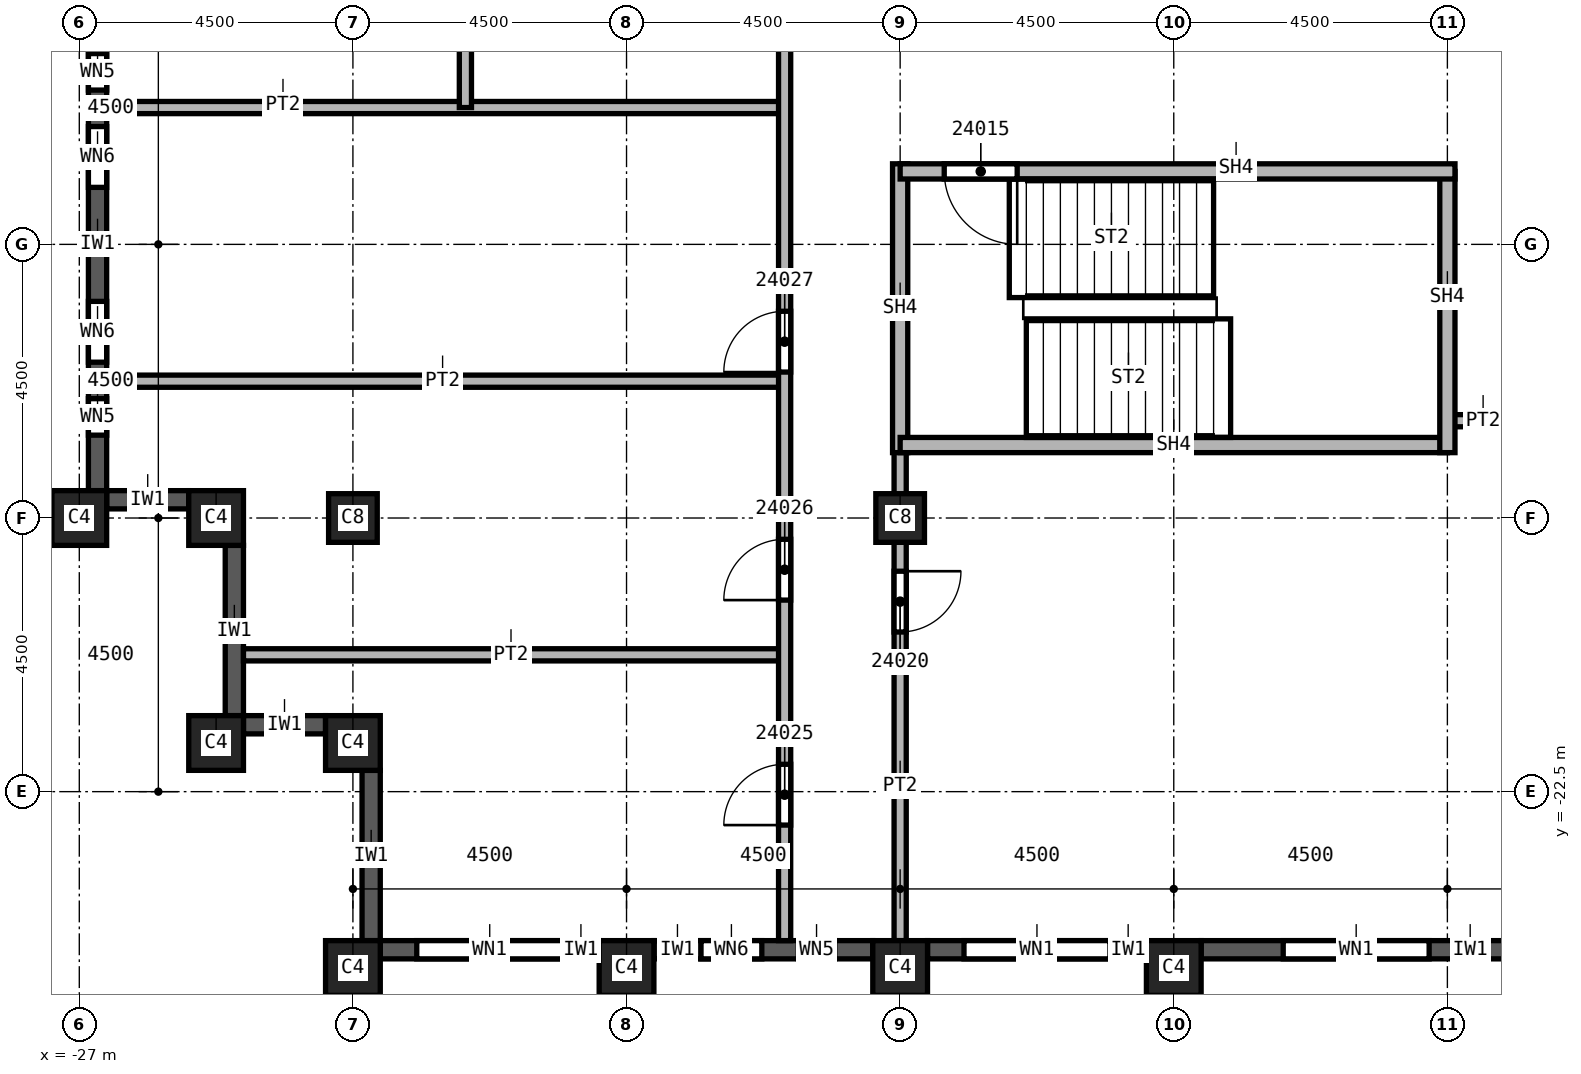
"""IFC4 building model, lengths in metres.
Left out: names, types, materials, properties, quantities, classifications, styles, units other than length and angle.
Written with IfcOpenShell. Run it as: python <this file> out.ifc"""

import sys

from ifc_helpers import new_model, si_unit, direction, frame, frame_2d, origin, origin_2d, place, context, subcontext, project, spatial, rectangle, extrude, element, fill, save


model = new_model("IFC4")
c1 = context("Model", 3, precision=1e-05, world=origin(), true_north=direction((0.0, 1.0)))
c2 = subcontext(c1, "Body", "Model", "MODEL_VIEW")
j1 = project(units=[si_unit("LENGTHUNIT", "METRE"), si_unit("PLANEANGLEUNIT", "RADIAN")], contexts=[c1])
p1 = place(None, origin())
s1 = spatial("IfcSite", under=j1, at=p1, CompositionType="ELEMENT")
p2 = place(p1, origin())
s2 = spatial("IfcBuilding", under=s1, at=p2, CompositionType="ELEMENT")
p3 = place(p2, frame((0.0, 0.0, 338.0)))
s3 = spatial("IfcBuildingStorey", under=s2, at=p3, CompositionType="ELEMENT", Elevation=338.0)
for number, where, z_axis, x_axis in (
    (1, (-13.5, -18.0, 0.0), (0.0, 0.0, 1.0), (1.0, 0.0, 0.0)),
    (2, (-22.5, -18.0, 0.0), (0.0, 0.0, 1.0), (1.0, 0.0, 0.0)),
):
    element("IfcColumn", number, at=place(p3, frame(where, z_axis=z_axis, x_axis=x_axis)), inside=s3, PredefinedType="COLUMN", context=c2, shape_type="SweptSolid", body=[
        extrude(rectangle(XDim=0.8, YDim=0.8, at=origin_2d()), origin(), (0.0, 0.0, 1.0), 3.74),
    ])
for number, where, z_axis, x_axis in (
    (3, (-9.0, -25.4, 0.0), (0.0, 0.0, 1.0), (1.0, 0.0, 0.0)),
    (4, (-13.5, -25.4, 0.0), (0.0, 0.0, 1.0), (1.0, 0.0, 0.0)),
    (5, (-18.0, -25.4, 0.0), (0.0, 0.0, 1.0), (1.0, 0.0, 0.0)),
    (6, (-22.5, -25.4, 0.0), (0.0, 0.0, 1.0), (1.0, 0.0, 0.0)),
    (7, (-27.0, -18.0, 0.0), (0.0, 0.0, 1.0), (0.0, 1.0, 0.0)),
    (8, (-22.5, -21.7, 0.0), (0.0, 0.0, 1.0), (1.0, 0.0, 0.0)),
    (9, (-24.75, -21.7, 0.0), (0.0, 0.0, 1.0), (1.0, 0.0, 0.0)),
    (10, (-24.75, -18.0, 0.0), (0.0, 0.0, 1.0), (1.0, 0.0, 0.0)),
):
    element("IfcColumn", number, at=place(p3, frame(where, z_axis=z_axis, x_axis=x_axis)), inside=s3, PredefinedType="COLUMN", context=c2, shape_type="SweptSolid", body=[
        extrude(rectangle(XDim=0.9, YDim=0.9, at=origin_2d()), origin(), (0.0, 0.0, 1.0), 3.74),
    ])
p4 = place(p3, frame((-26.7, -9.45, 0.0), z_axis=(0.0, 0.0, 1.0), x_axis=(0.0, -1.0, 0.0)))
e11 = element("IfcWall", 11, at=p4, inside=s3, PredefinedType="SOLIDWALL", context=c2, shape_type="SweptSolid", body=[
    extrude(rectangle(XDim=8.1, YDim=0.3, at=frame_2d((4.05, 0.0))), origin(), (0.0, 0.0, 1.0), 3.14),
])
p5 = place(p4, frame((0.913, 0.0, 0.8)))
e12 = element("IfcOpeningElement", 12, at=p5, cuts=e11, PredefinedType="OPENING", context=c2, shape_type="SweptSolid", body=[
    extrude(rectangle(XDim=0.6, YDim=1.95, at=frame_2d((0.3, 0.975))), frame((0.0, 0.15, 0.0), z_axis=(0.0, -1.0, 0.0), x_axis=(1.0, 0.0, 0.0)), (0.0, 0.0, 1.0), 0.3),
])
p6 = place(p4, frame((2.113, 0.0, 0.8)))
e13 = element("IfcOpeningElement", 13, at=p6, cuts=e11, PredefinedType="OPENING", context=c2, shape_type="SweptSolid", body=[
    extrude(rectangle(XDim=1.0, YDim=1.95, at=frame_2d((0.5, 0.975))), frame((0.0, 0.15, 0.0), z_axis=(0.0, -1.0, 0.0), x_axis=(1.0, 0.0, 0.0)), (0.0, 0.0, 1.0), 0.3),
])
p7 = place(p4, frame((4.988, 0.0, 0.8)))
e14 = element("IfcOpeningElement", 14, at=p7, cuts=e11, PredefinedType="OPENING", context=c2, shape_type="SweptSolid", body=[
    extrude(rectangle(XDim=1.0, YDim=1.95, at=frame_2d((0.5, 0.975))), frame((0.0, 0.15, 0.0), z_axis=(0.0, -1.0, 0.0), x_axis=(1.0, 0.0, 0.0)), (0.0, 0.0, 1.0), 0.3),
])
p8 = place(p4, frame((6.587, 0.0, 0.8)))
e15 = element("IfcOpeningElement", 15, at=p8, cuts=e11, PredefinedType="OPENING", context=c2, shape_type="SweptSolid", body=[
    extrude(rectangle(XDim=0.6, YDim=1.95, at=frame_2d((0.3, 0.975))), frame((0.0, 0.15, 0.0), z_axis=(0.0, -1.0, 0.0), x_axis=(1.0, 0.0, 0.0)), (0.0, 0.0, 1.0), 0.3),
])
p9 = place(p3, frame((-26.55, -17.7, 0.0), z_axis=(0.0, 0.0, 1.0), x_axis=(1.0, 0.0, 0.0)))
e16 = element("IfcWall", 16, at=p9, inside=s3, PredefinedType="SOLIDWALL", context=c2, shape_type="SweptSolid", body=[
    extrude(rectangle(XDim=1.35, YDim=0.3, at=frame_2d((0.675, 0.0))), origin(), (0.0, 0.0, 1.0), 3.14),
])
p10 = place(p3, frame((-24.45, -18.45, 0.0), z_axis=(0.0, 0.0, 1.0), x_axis=(0.0, -1.0, 0.0)))
e17 = element("IfcWall", 17, at=p10, inside=s3, PredefinedType="SOLIDWALL", context=c2, shape_type="SweptSolid", body=[
    extrude(rectangle(XDim=2.8, YDim=0.3, at=frame_2d((1.4, 0.0))), origin(), (0.0, 0.0, 1.0), 3.14),
])
p11 = place(p3, frame((-24.3, -21.4, 0.0), z_axis=(0.0, 0.0, 1.0), x_axis=(1.0, 0.0, 0.0)))
e18 = element("IfcWall", 18, at=p11, inside=s3, PredefinedType="SOLIDWALL", context=c2, shape_type="SweptSolid", body=[
    extrude(rectangle(XDim=1.35, YDim=0.3, at=frame_2d((0.675, 0.0))), origin(), (0.0, 0.0, 1.0), 3.14),
])
p12 = place(p3, frame((-22.2, -22.15, 0.0), z_axis=(0.0, 0.0, 1.0), x_axis=(0.0, -1.0, 0.0)))
e19 = element("IfcWall", 19, at=p12, inside=s3, PredefinedType="SOLIDWALL", context=c2, shape_type="SweptSolid", body=[
    extrude(rectangle(XDim=2.8, YDim=0.3, at=frame_2d((1.4, 0.0))), origin(), (0.0, 0.0, 1.0), 3.14),
])
p13 = place(p3, frame((-22.05, -25.1, 0.0), z_axis=(0.0, 0.0, 1.0), x_axis=(1.0, 0.0, 0.0)))
e20 = element("IfcWall", 20, at=p13, inside=s3, PredefinedType="SOLIDWALL", context=c2, shape_type="SweptSolid", body=[
    extrude(rectangle(XDim=3.6, YDim=0.3, at=frame_2d((1.8, 0.0))), origin(), (0.0, 0.0, 1.0), 3.14),
])
p14 = place(p13, frame((0.6, 0.0, 0.8)))
e21 = element("IfcOpeningElement", 21, at=p14, cuts=e20, PredefinedType="OPENING", context=c2, shape_type="SweptSolid", body=[
    extrude(rectangle(XDim=2.4, YDim=1.95, at=frame_2d((1.2, 0.975))), frame((0.0, 0.15, 0.0), z_axis=(0.0, -1.0, 0.0), x_axis=(1.0, 0.0, 0.0)), (0.0, 0.0, 1.0), 0.3),
])
p15 = place(p3, frame((-17.55, -25.1, 0.0), z_axis=(0.0, 0.0, 1.0), x_axis=(1.0, 0.0, 0.0)))
e22 = element("IfcWall", 22, at=p15, inside=s3, PredefinedType="SOLIDWALL", context=c2, shape_type="SweptSolid", body=[
    extrude(rectangle(XDim=3.6, YDim=0.3, at=frame_2d((1.8, 0.0))), origin(), (0.0, 0.0, 1.0), 3.14),
])
p16 = place(p15, frame((0.775, 0.0, 0.8)))
e23 = element("IfcOpeningElement", 23, at=p16, cuts=e22, PredefinedType="OPENING", context=c2, shape_type="SweptSolid", body=[
    extrude(rectangle(XDim=1.0, YDim=1.95, at=frame_2d((0.5, 0.975))), frame((0.0, 0.15, 0.0), z_axis=(0.0, -1.0, 0.0), x_axis=(1.0, 0.0, 0.0)), (0.0, 0.0, 1.0), 0.3),
])
p17 = place(p15, frame((2.375, 0.0, 0.8)))
e24 = element("IfcOpeningElement", 24, at=p17, cuts=e22, PredefinedType="OPENING", context=c2, shape_type="SweptSolid", body=[
    extrude(rectangle(XDim=0.6, YDim=1.95, at=frame_2d((0.3, 0.975))), frame((0.0, 0.15, 0.0), z_axis=(0.0, -1.0, 0.0), x_axis=(1.0, 0.0, 0.0)), (0.0, 0.0, 1.0), 0.3),
])
p18 = place(p3, frame((-13.05, -25.1, 0.0), z_axis=(0.0, 0.0, 1.0), x_axis=(1.0, 0.0, 0.0)))
e25 = element("IfcWall", 25, at=p18, inside=s3, PredefinedType="SOLIDWALL", context=c2, shape_type="SweptSolid", body=[
    extrude(rectangle(XDim=3.6, YDim=0.3, at=frame_2d((1.8, 0.0))), origin(), (0.0, 0.0, 1.0), 3.14),
])
p19 = place(p18, frame((0.6, 0.0, 0.8)))
e26 = element("IfcOpeningElement", 26, at=p19, cuts=e25, PredefinedType="OPENING", context=c2, shape_type="SweptSolid", body=[
    extrude(rectangle(XDim=2.4, YDim=1.95, at=frame_2d((1.2, 0.975))), frame((0.0, 0.15, 0.0), z_axis=(0.0, -1.0, 0.0), x_axis=(1.0, 0.0, 0.0)), (0.0, 0.0, 1.0), 0.3),
])
p20 = place(p3, frame((-8.55, -25.1, 0.0), z_axis=(0.0, 0.0, 1.0), x_axis=(1.0, 0.0, 0.0)))
e27 = element("IfcWall", 27, at=p20, inside=s3, PredefinedType="SOLIDWALL", context=c2, shape_type="SweptSolid", body=[
    extrude(rectangle(XDim=5.1, YDim=0.3, at=frame_2d((2.55, 0.0))), origin(), (0.0, 0.0, 1.0), 3.14),
])
p21 = place(p20, frame((1.35, 0.0, 0.8)))
e28 = element("IfcOpeningElement", 28, at=p21, cuts=e27, PredefinedType="OPENING", context=c2, shape_type="SweptSolid", body=[
    extrude(rectangle(XDim=2.4, YDim=1.95, at=frame_2d((1.2, 0.975))), frame((0.0, 0.15, 0.0), z_axis=(0.0, -1.0, 0.0), x_axis=(1.0, 0.0, 0.0)), (0.0, 0.0, 1.0), 0.3),
])
for number, where, z_axis, x_axis in (
    (29, (-26.55, -15.75, 0.0), (0.0, 0.0, 1.0), (1.0, 0.0, 0.0)),
    (30, (-26.55, -11.25, 0.0), (0.0, 0.0, 1.0), (1.0, 0.0, 0.0)),
):
    element("IfcWall", number, at=place(p3, frame(where, z_axis=z_axis, x_axis=x_axis)), inside=s3, PredefinedType="PARTITIONING", context=c2, shape_type="SweptSolid", body=[
        extrude(rectangle(XDim=11.15, YDim=0.2, at=frame_2d((5.575, 0.0))), origin(), (0.0, 0.0, 1.0), 3.74),
    ])
p22 = place(p3, frame((-24.3, -20.25, 0.0), z_axis=(0.0, 0.0, 1.0), x_axis=(1.0, 0.0, 0.0)))
e31 = element("IfcWall", 31, at=p22, inside=s3, PredefinedType="PARTITIONING", context=c2, shape_type="SweptSolid", body=[
    extrude(rectangle(XDim=8.9, YDim=0.2, at=frame_2d((4.45, 0.0))), origin(), (0.0, 0.0, 1.0), 3.74),
])
p23 = place(p3, frame((-20.65, -11.25, 0.0), z_axis=(0.0, 0.0, 1.0), x_axis=(0.0, 1.0, 0.0)))
e32 = element("IfcWall", 32, at=p23, inside=s3, PredefinedType="PARTITIONING", context=c2, shape_type="SweptSolid", body=[
    extrude(rectangle(XDim=11.25, YDim=0.2, at=frame_2d((5.625, 0.0))), origin(), (0.0, 0.0, 1.0), 3.74),
])
p24 = place(p23, frame((7.75, 0.0, 0.0)))
e33 = element("IfcOpeningElement", 33, at=p24, cuts=e32, PredefinedType="OPENING", context=c2, shape_type="SweptSolid", body=[
    extrude(rectangle(XDim=1.0, YDim=2.1, at=frame_2d((0.5, 1.05))), frame((0.0, 0.1, 0.0), z_axis=(0.0, -1.0, 0.0), x_axis=(1.0, 0.0, 0.0)), (0.0, 0.0, 1.0), 0.2),
])
p25 = place(p3, frame((-15.4, -24.95, 0.0), z_axis=(0.0, 0.0, 1.0), x_axis=(0.0, 1.0, 0.0)))
e34 = element("IfcWall", 34, at=p25, inside=s3, PredefinedType="PARTITIONING", context=c2, shape_type="SweptSolid", body=[
    extrude(rectangle(XDim=38.55, YDim=0.2, at=frame_2d((19.275, 0.0))), origin(), (0.0, 0.0, 1.0), 3.74),
])
p26 = place(p25, frame((30.5, 0.0, 0.0)))
e35 = element("IfcOpeningElement", 35, at=p26, cuts=e34, PredefinedType="OPENING", context=c2, shape_type="SweptSolid", body=[
    extrude(rectangle(XDim=1.0, YDim=2.1, at=frame_2d((0.5, 1.05))), frame((0.0, 0.1, 0.0), z_axis=(0.0, -1.0, 0.0), x_axis=(1.0, 0.0, 0.0)), (0.0, 0.0, 1.0), 0.2),
])
p27 = place(p25, frame((36.35, 0.0, 0.0)))
e36 = element("IfcOpeningElement", 36, at=p27, cuts=e34, PredefinedType="OPENING", context=c2, shape_type="SweptSolid", body=[
    extrude(rectangle(XDim=1.0, YDim=2.1, at=frame_2d((0.5, 1.05))), frame((0.0, 0.1, 0.0), z_axis=(0.0, -1.0, 0.0), x_axis=(1.0, 0.0, 0.0)), (0.0, 0.0, 1.0), 0.2),
])
p28 = place(p25, frame((1.9, 0.0, 0.0)))
e37 = element("IfcOpeningElement", 37, at=p28, cuts=e34, PredefinedType="OPENING", context=c2, shape_type="SweptSolid", body=[
    extrude(rectangle(XDim=1.0, YDim=2.1, at=frame_2d((0.5, 1.05))), frame((0.0, 0.1, 0.0), z_axis=(0.0, -1.0, 0.0), x_axis=(1.0, 0.0, 0.0)), (0.0, 0.0, 1.0), 0.2),
])
p29 = place(p25, frame((5.6, 0.0, 0.0)))
e38 = element("IfcOpeningElement", 38, at=p29, cuts=e34, PredefinedType="OPENING", context=c2, shape_type="SweptSolid", body=[
    extrude(rectangle(XDim=1.0, YDim=2.1, at=frame_2d((0.5, 1.05))), frame((0.0, 0.1, 0.0), z_axis=(0.0, -1.0, 0.0), x_axis=(1.0, 0.0, 0.0)), (0.0, 0.0, 1.0), 0.2),
])
p30 = place(p25, frame((9.35, 0.0, 0.0)))
e39 = element("IfcOpeningElement", 39, at=p30, cuts=e34, PredefinedType="OPENING", context=c2, shape_type="SweptSolid", body=[
    extrude(rectangle(XDim=1.0, YDim=2.1, at=frame_2d((0.5, 1.05))), frame((0.0, 0.1, 0.0), z_axis=(0.0, -1.0, 0.0), x_axis=(1.0, 0.0, 0.0)), (0.0, 0.0, 1.0), 0.2),
])
p31 = place(p25, frame((16.1, 0.0, 0.0)))
e40 = element("IfcOpeningElement", 40, at=p31, cuts=e34, PredefinedType="OPENING", context=c2, shape_type="SweptSolid", body=[
    extrude(rectangle(XDim=1.0, YDim=2.1, at=frame_2d((0.5, 1.05))), frame((0.0, 0.1, 0.0), z_axis=(0.0, -1.0, 0.0), x_axis=(1.0, 0.0, 0.0)), (0.0, 0.0, 1.0), 0.2),
])
p32 = place(p3, frame((-13.5, -16.675, 0.0), z_axis=(0.0, 0.0, 1.0), x_axis=(0.0, -1.0, 0.0)))
e41 = element("IfcWall", 41, at=p32, inside=s3, PredefinedType="PARTITIONING", context=c2, shape_type="SweptSolid", body=[
    extrude(rectangle(XDim=8.275, YDim=0.2, at=frame_2d((4.137, 0.0))), origin(), (0.0, 0.0, 1.0), 3.74),
])
p33 = place(p32, frame((2.2, 0.0, 0.0)))
e42 = element("IfcOpeningElement", 42, at=p33, cuts=e41, PredefinedType="OPENING", context=c2, shape_type="SweptSolid", body=[
    extrude(rectangle(XDim=1.0, YDim=2.1, at=frame_2d((0.5, 1.05))), frame((0.0, 0.1, 0.0), z_axis=(0.0, -1.0, 0.0), x_axis=(1.0, 0.0, 0.0)), (0.0, 0.0, 1.0), 0.2),
])
p34 = place(p3, frame((-3.45, -16.4, 0.0), z_axis=(0.0, 0.0, 1.0), x_axis=(-1.0, 0.0, 0.0)))
e43 = element("IfcWall", 43, at=p34, inside=s3, PredefinedType="PARTITIONING", context=c2, shape_type="SweptSolid", body=[
    extrude(rectangle(XDim=1.05, YDim=0.2, at=frame_2d((0.525, 0.0))), origin(), (0.0, 0.0, 1.0), 3.74),
])
p35 = place(p3, frame((-13.5, -12.175, 0.0), z_axis=(0.0, 0.0, 1.0), x_axis=(0.0, -1.0, 0.0)))
e44 = element("IfcWall", 44, at=p35, inside=s3, PredefinedType="SOLIDWALL", context=c2, shape_type="SweptSolid", body=[
    extrude(rectangle(XDim=4.75, YDim=0.25, at=frame_2d((2.375, 0.0))), origin(), (0.0, 0.0, 1.0), 3.74),
])
p36 = place(p3, frame((-4.5, -16.8, 0.0), z_axis=(0.0, 0.0, 1.0), x_axis=(-1.0, 0.0, 0.0)))
e45 = element("IfcWall", 45, at=p36, inside=s3, PredefinedType="SOLIDWALL", context=c2, shape_type="SweptSolid", body=[
    extrude(rectangle(XDim=9.0, YDim=0.25, at=frame_2d((4.5, 0.0))), origin(), (0.0, 0.0, 1.0), 3.74),
])
p37 = place(p3, frame((-4.5, -12.3, 0.0), z_axis=(0.0, 0.0, 1.0), x_axis=(0.0, -1.0, 0.0)))
e46 = element("IfcWall", 46, at=p37, inside=s3, PredefinedType="SOLIDWALL", context=c2, shape_type="SweptSolid", body=[
    extrude(rectangle(XDim=4.625, YDim=0.25, at=frame_2d((2.312, 0.0))), origin(), (0.0, 0.0, 1.0), 3.74),
])
p38 = place(p3, frame((-4.375, -12.3, 0.0), z_axis=(0.0, 0.0, 1.0), x_axis=(-1.0, 0.0, 0.0)))
e47 = element("IfcWall", 47, at=p38, inside=s3, PredefinedType="SOLIDWALL", context=c2, shape_type="SweptSolid", body=[
    extrude(rectangle(XDim=9.125, YDim=0.25, at=frame_2d((4.562, 0.0))), origin(), (0.0, 0.0, 1.0), 3.74),
])
p39 = place(p38, frame((7.2, 0.0, 0.0)))
e48 = element("IfcOpeningElement", 48, at=p39, cuts=e47, PredefinedType="OPENING", context=c2, shape_type="SweptSolid", body=[
    extrude(rectangle(XDim=1.2, YDim=2.1, at=frame_2d((0.6, 1.05))), frame((0.0, 0.125, 0.0), z_axis=(0.0, -1.0, 0.0), x_axis=(1.0, 0.0, 0.0)), (0.0, 0.0, 1.0), 0.25),
])
p40 = place(p14, origin())
e49 = element("IfcWindow", 49, at=p40, inside=s3, PartitioningType="SINGLE_PANEL", PredefinedType="WINDOW", context=c2, shape_type="SweptSolid", body=[
    extrude(rectangle(XDim=2.4, YDim=1.95, at=frame_2d((1.2, 0.975))), frame((0.0, 0.03, 0.0), z_axis=(0.0, -1.0, 0.0), x_axis=(1.0, 0.0, 0.0)), (0.0, 0.0, 1.0), 0.06),
])
fill(e21, e49)
p41 = place(p19, origin())
e50 = element("IfcWindow", 50, at=p41, inside=s3, PartitioningType="SINGLE_PANEL", PredefinedType="WINDOW", context=c2, shape_type="SweptSolid", body=[
    extrude(rectangle(XDim=2.4, YDim=1.95, at=frame_2d((1.2, 0.975))), frame((0.0, 0.03, 0.0), z_axis=(0.0, -1.0, 0.0), x_axis=(1.0, 0.0, 0.0)), (0.0, 0.0, 1.0), 0.06),
])
fill(e26, e50)
p42 = place(p21, origin())
e51 = element("IfcWindow", 51, at=p42, inside=s3, PartitioningType="SINGLE_PANEL", PredefinedType="WINDOW", context=c2, shape_type="SweptSolid", body=[
    extrude(rectangle(XDim=2.4, YDim=1.95, at=frame_2d((1.2, 0.975))), frame((0.0, 0.03, 0.0), z_axis=(0.0, -1.0, 0.0), x_axis=(1.0, 0.0, 0.0)), (0.0, 0.0, 1.0), 0.06),
])
fill(e28, e51)
p43 = place(p39, origin())
e52 = element("IfcDoor", 52, at=p43, inside=s3, OperationType="SINGLE_SWING_RIGHT", PredefinedType="DOOR", context=c2, shape_type="SweptSolid", body=[
    extrude(rectangle(XDim=1.2, YDim=2.1, at=frame_2d((0.6, 1.05))), frame((0.0, 0.025, 0.0), z_axis=(0.0, -1.0, 0.0), x_axis=(1.0, 0.0, 0.0)), (0.0, 0.0, 1.0), 0.05),
])
fill(e48, e52)
p44 = place(p33, origin())
e53 = element("IfcDoor", 53, at=p44, inside=s3, OperationType="SINGLE_SWING_LEFT", PredefinedType="DOOR", context=c2, shape_type="SweptSolid", body=[
    extrude(rectangle(XDim=1.0, YDim=2.1, at=frame_2d((0.5, 1.05))), frame((0.0, 0.025, 0.0), z_axis=(0.0, -1.0, 0.0), x_axis=(1.0, 0.0, 0.0)), (0.0, 0.0, 1.0), 0.05),
])
fill(e42, e53)
p45 = place(p28, origin())
e54 = element("IfcDoor", 54, at=p45, inside=s3, OperationType="SINGLE_SWING_RIGHT", PredefinedType="DOOR", context=c2, shape_type="SweptSolid", body=[
    extrude(rectangle(XDim=1.0, YDim=2.1, at=frame_2d((0.5, 1.05))), frame((0.0, 0.025, 0.0), z_axis=(0.0, -1.0, 0.0), x_axis=(1.0, 0.0, 0.0)), (0.0, 0.0, 1.0), 0.05),
])
fill(e37, e54)
p46 = place(p29, origin())
e55 = element("IfcDoor", 55, at=p46, inside=s3, OperationType="SINGLE_SWING_LEFT", PredefinedType="DOOR", context=c2, shape_type="SweptSolid", body=[
    extrude(rectangle(XDim=1.0, YDim=2.1, at=frame_2d((0.5, 1.05))), frame((0.0, 0.025, 0.0), z_axis=(0.0, -1.0, 0.0), x_axis=(1.0, 0.0, 0.0)), (0.0, 0.0, 1.0), 0.05),
])
fill(e38, e55)
p47 = place(p30, origin())
e56 = element("IfcDoor", 56, at=p47, inside=s3, OperationType="SINGLE_SWING_RIGHT", PredefinedType="DOOR", context=c2, shape_type="SweptSolid", body=[
    extrude(rectangle(XDim=1.0, YDim=2.1, at=frame_2d((0.5, 1.05))), frame((0.0, 0.025, 0.0), z_axis=(0.0, -1.0, 0.0), x_axis=(1.0, 0.0, 0.0)), (0.0, 0.0, 1.0), 0.05),
])
fill(e39, e56)
p48 = place(p5, origin())
e57 = element("IfcWindow", 57, at=p48, inside=s3, PartitioningType="SINGLE_PANEL", PredefinedType="WINDOW", context=c2, shape_type="SweptSolid", body=[
    extrude(rectangle(XDim=0.6, YDim=1.95, at=frame_2d((0.3, 0.975))), frame((0.0, 0.03, 0.0), z_axis=(0.0, -1.0, 0.0), x_axis=(1.0, 0.0, 0.0)), (0.0, 0.0, 1.0), 0.06),
])
fill(e12, e57)
p49 = place(p6, origin())
e58 = element("IfcWindow", 58, at=p49, inside=s3, PartitioningType="SINGLE_PANEL", PredefinedType="WINDOW", context=c2, shape_type="SweptSolid", body=[
    extrude(rectangle(XDim=1.0, YDim=1.95, at=frame_2d((0.5, 0.975))), frame((0.0, 0.03, 0.0), z_axis=(0.0, -1.0, 0.0), x_axis=(1.0, 0.0, 0.0)), (0.0, 0.0, 1.0), 0.06),
])
fill(e13, e58)
p50 = place(p7, origin())
e59 = element("IfcWindow", 59, at=p50, inside=s3, PartitioningType="SINGLE_PANEL", PredefinedType="WINDOW", context=c2, shape_type="SweptSolid", body=[
    extrude(rectangle(XDim=1.0, YDim=1.95, at=frame_2d((0.5, 0.975))), frame((0.0, 0.03, 0.0), z_axis=(0.0, -1.0, 0.0), x_axis=(1.0, 0.0, 0.0)), (0.0, 0.0, 1.0), 0.06),
])
fill(e14, e59)
p51 = place(p8, origin())
e60 = element("IfcWindow", 60, at=p51, inside=s3, PartitioningType="SINGLE_PANEL", PredefinedType="WINDOW", context=c2, shape_type="SweptSolid", body=[
    extrude(rectangle(XDim=0.6, YDim=1.95, at=frame_2d((0.3, 0.975))), frame((0.0, 0.03, 0.0), z_axis=(0.0, -1.0, 0.0), x_axis=(1.0, 0.0, 0.0)), (0.0, 0.0, 1.0), 0.06),
])
fill(e15, e60)
p52 = place(p16, origin())
e61 = element("IfcWindow", 61, at=p52, inside=s3, PartitioningType="SINGLE_PANEL", PredefinedType="WINDOW", context=c2, shape_type="SweptSolid", body=[
    extrude(rectangle(XDim=1.0, YDim=1.95, at=frame_2d((0.5, 0.975))), frame((0.0, 0.03, 0.0), z_axis=(0.0, -1.0, 0.0), x_axis=(1.0, 0.0, 0.0)), (0.0, 0.0, 1.0), 0.06),
])
fill(e23, e61)
p53 = place(p17, origin())
e62 = element("IfcWindow", 62, at=p53, inside=s3, PartitioningType="SINGLE_PANEL", PredefinedType="WINDOW", context=c2, shape_type="SweptSolid", body=[
    extrude(rectangle(XDim=0.6, YDim=1.95, at=frame_2d((0.3, 0.975))), frame((0.0, 0.03, 0.0), z_axis=(0.0, -1.0, 0.0), x_axis=(1.0, 0.0, 0.0)), (0.0, 0.0, 1.0), 0.06),
])
fill(e24, e62)
save(model, sys.argv[1])
